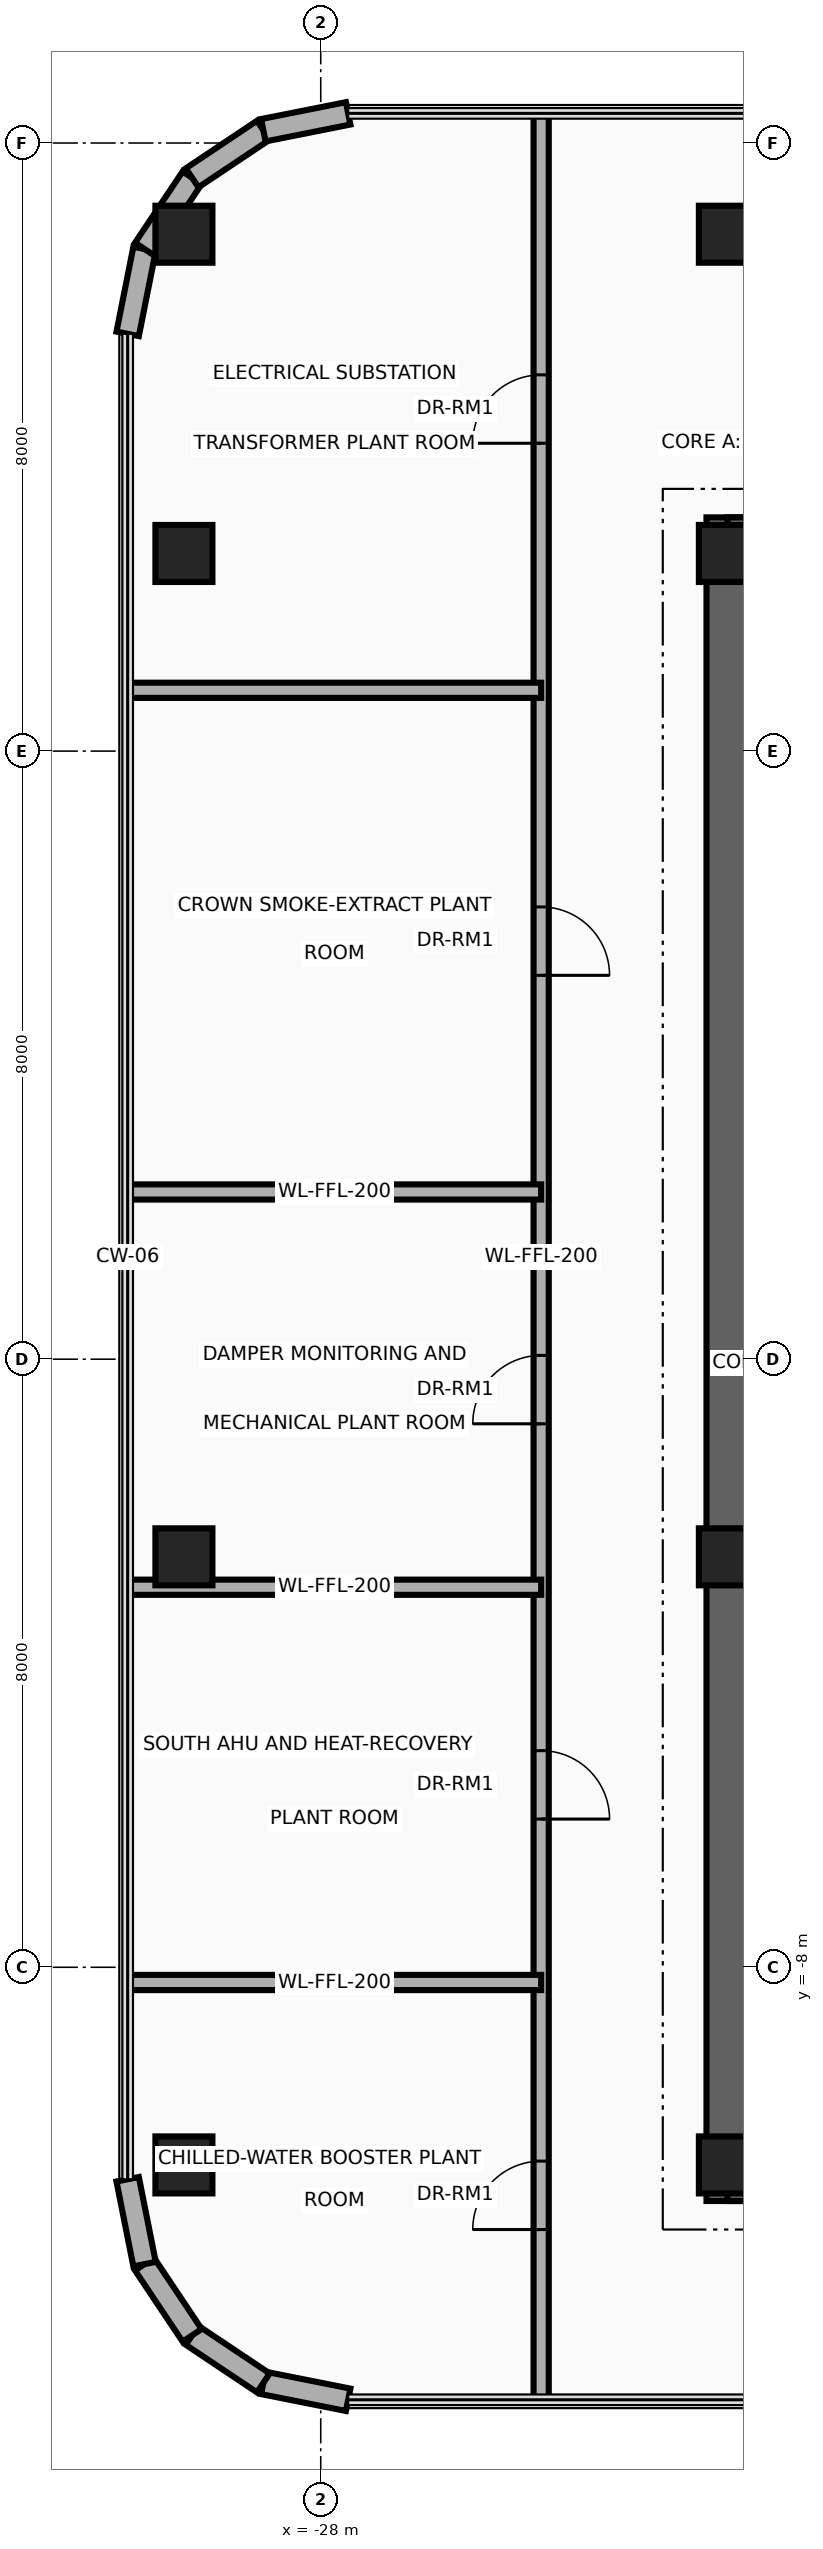
"""IFC4 building model, lengths in metres.
Left out: names, types, materials, properties, quantities, classifications, styles, units other than length and angle.
Written with IfcOpenShell. Run it as: python <this file> out.ifc"""

import sys

from ifc_helpers import new_model, si_unit, direction, frame, frame_2d, origin, origin_2d, place, context, subcontext, project, spatial, rectangle, extrude, source, transform, mapped, element, fill, save


model = new_model("IFC4")
c1 = context("Model", 3, precision=1e-05, world=origin(), true_north=direction((0.0, 1.0)))
c2 = subcontext(c1, "Body", "Model", "MODEL_VIEW")
j1 = project(units=[si_unit("LENGTHUNIT", "METRE"), si_unit("PLANEANGLEUNIT", "RADIAN")], contexts=[c1])
p1 = place(None, origin())
s1 = spatial("IfcSite", under=j1, at=p1, CompositionType="ELEMENT")
p2 = place(p1, origin())
s2 = spatial("IfcBuilding", under=s1, at=p2, CompositionType="ELEMENT")
p3 = place(p2, frame((0.0, 0.0, 299.4)))
s3 = spatial("IfcBuildingStorey", under=s2, at=p3, CompositionType="ELEMENT", Elevation=299.4)
p4 = place(p3, frame((-22.65, -11.075, 0.0), z_axis=(0.0, 0.0, 1.0), x_axis=(0.0, 1.0, 0.0)))
e1 = element("IfcWall", 1, at=p4, inside=s3, PredefinedType="SHEAR", context=c2, shape_type="SweptSolid", body=[
    extrude(rectangle(XDim=22.15, YDim=0.55, at=frame_2d((11.075, 0.0))), origin(), (0.0, 0.0, 1.0), 3.96),
])
for number, where, z_axis, x_axis in (
    (2, (-22.65, 10.8, 0.0), (0.0, 0.0, 1.0), (1.0, 0.0, 0.0)),
    (3, (-22.65, -10.8, 0.0), (0.0, 0.0, 1.0), (1.0, 0.0, 0.0)),
):
    element("IfcWall", number, at=place(p3, frame(where, z_axis=z_axis, x_axis=x_axis)), inside=s3, PredefinedType="SHEAR", context=c2, shape_type="SweptSolid", body=[
        extrude(rectangle(XDim=10.25, YDim=0.55, at=frame_2d((5.125, 0.0))), origin(), (0.0, 0.0, 1.0), 3.96),
    ])
m1 = source(origin(), c2, "Body", "SweptSolid", [
    extrude(rectangle(XDim=0.75, YDim=0.75, at=origin_2d()), origin(), (0.0, 0.0, 1.0), 4.2),
])
for number, where, z_axis, x_axis in (
    (4, (-29.8, -10.6, 0.0), (0.0, 0.0, 1.0), (1.0, 0.0, 0.0)),
    (5, (-22.65, -10.6, 0.0), (0.0, 0.0, 1.0), (1.0, 0.0, 0.0)),
    (6, (-29.8, -2.6, 0.0), (0.0, 0.0, 1.0), (1.0, 0.0, 0.0)),
    (7, (-22.65, -2.6, 0.0), (0.0, 0.0, 1.0), (1.0, 0.0, 0.0)),
    (8, (-29.8, 10.6, 0.0), (0.0, 0.0, 1.0), (1.0, 0.0, 0.0)),
    (9, (-22.65, 10.6, 0.0), (0.0, 0.0, 1.0), (1.0, 0.0, 0.0)),
    (10, (-29.8, 14.8, 0.0), (0.0, 0.0, 1.0), (1.0, 0.0, 0.0)),
    (11, (-22.65, 14.8, 0.0), (0.0, 0.0, 1.0), (1.0, 0.0, 0.0)),
):
    element("IfcColumn", number, at=place(p3, frame(where, z_axis=z_axis, x_axis=x_axis)), inside=s3, PredefinedType="COLUMN", context=c2, shape_type="MappedRepresentation", body=[
        mapped(m1, transform((0.0, 0.0, 0.0), x_axis=(1.0, 0.0, 0.0), y_axis=(0.0, 1.0, 0.0), z_axis=(0.0, 0.0, 1.0), scale=1.0)),
    ])
p5 = place(p3, frame((-30.54, 13.489, 0.0), z_axis=(0.0, 0.0, 1.0), x_axis=(0.195043173023, 0.980794657743, 0.0)))
e12 = element("IfcWall", 12, at=p5, inside=s3, PredefinedType="SOLIDWALL", context=c2, shape_type="SweptSolid", body=[
    extrude(rectangle(XDim=1.138, YDim=0.3, at=frame_2d((0.569, 0.0))), origin(), (0.0, 0.0, 1.0), 3.96),
])
for number, where, z_axis, x_axis in (
    (13, (-30.318, 14.605, 0.0), (0.0, 0.0, 1.0), (0.556, 0.831, 0.0)),
    (14, (-29.692, 15.542, 0.0), (0.0, 0.0, 1.0), (0.831, 0.556, 0.0)),
):
    element("IfcWall", number, at=place(p3, frame(where, z_axis=z_axis, x_axis=x_axis)), inside=s3, PredefinedType="SOLIDWALL", context=c2, shape_type="SweptSolid", body=[
        extrude(rectangle(XDim=1.127, YDim=0.3, at=frame_2d((0.563, 0.0))), origin(), (0.0, 0.0, 1.0), 3.96),
    ])
for number, where, z_axis, x_axis in (
    (15, (-28.755, 16.168, 0.0), (0.0, 0.0, 1.0), (0.981, 0.195, 0.0)),
    (16, (-27.639, -13.69, 0.0), (0.0, 0.0, 1.0), (-0.981, 0.195, 0.0)),
):
    element("IfcWall", number, at=place(p3, frame(where, z_axis=z_axis, x_axis=x_axis)), inside=s3, PredefinedType="SOLIDWALL", context=c2, shape_type="SweptSolid", body=[
        extrude(rectangle(XDim=1.138, YDim=0.3, at=frame_2d((0.569, 0.0))), origin(), (0.0, 0.0, 1.0), 3.96),
    ])
for number, where, z_axis, x_axis in (
    (17, (-28.755, -13.468, 0.0), (0.0, 0.0, 1.0), (-0.831, 0.556, 0.0)),
    (18, (-29.692, -12.842, 0.0), (0.0, 0.0, 1.0), (-0.556, 0.831, 0.0)),
):
    element("IfcWall", number, at=place(p3, frame(where, z_axis=z_axis, x_axis=x_axis)), inside=s3, PredefinedType="SOLIDWALL", context=c2, shape_type="SweptSolid", body=[
        extrude(rectangle(XDim=1.127, YDim=0.3, at=frame_2d((0.563, 0.0))), origin(), (0.0, 0.0, 1.0), 3.96),
    ])
p6 = place(p3, frame((-30.318, -11.905, 0.0), z_axis=(0.0, 0.0, 1.0), x_axis=(-0.195043173023, 0.980794657743, 0.0)))
e19 = element("IfcWall", 19, at=p6, inside=s3, PredefinedType="SOLIDWALL", context=c2, shape_type="SweptSolid", body=[
    extrude(rectangle(XDim=1.138, YDim=0.3, at=frame_2d((0.569, 0.0))), origin(), (0.0, 0.0, 1.0), 3.96),
])
p7 = place(p3, frame((-25.1, -13.69, 0.0), z_axis=(0.0, 0.0, 1.0), x_axis=(0.0, 1.0, 0.0)))
e20 = element("IfcWall", 20, at=p7, inside=s3, PredefinedType="PARTITIONING", context=c2, shape_type="SweptSolid", body=[
    extrude(rectangle(XDim=30.08, YDim=0.2, at=frame_2d((15.04, 0.0))), origin(), (0.0, 0.0, 1.0), 3.323),
])
p8 = place(p7, frame((2.24, 0.0, 0.0)))
e21 = element("IfcOpeningElement", 21, at=p8, cuts=e20, PredefinedType="OPENING", context=c2, shape_type="SweptSolid", body=[
    extrude(rectangle(XDim=0.9, YDim=2.1, at=frame_2d((0.45, 1.05))), frame((0.0, 0.115, 0.0), z_axis=(0.0, -1.0, 0.0), x_axis=(1.0, 0.0, 0.0)), (0.0, 0.0, 1.0), 0.23),
])
p9 = place(p7, frame((7.64, 0.0, 0.0)))
e22 = element("IfcOpeningElement", 22, at=p9, cuts=e20, PredefinedType="OPENING", context=c2, shape_type="SweptSolid", body=[
    extrude(rectangle(XDim=0.9, YDim=2.1, at=frame_2d((0.45, 1.05))), frame((0.0, 0.115, 0.0), z_axis=(0.0, -1.0, 0.0), x_axis=(1.0, 0.0, 0.0)), (0.0, 0.0, 1.0), 0.23),
])
p10 = place(p7, frame((12.84, 0.0, 0.0)))
e23 = element("IfcOpeningElement", 23, at=p10, cuts=e20, PredefinedType="OPENING", context=c2, shape_type="SweptSolid", body=[
    extrude(rectangle(XDim=0.9, YDim=2.1, at=frame_2d((0.45, 1.05))), frame((0.0, 0.115, 0.0), z_axis=(0.0, -1.0, 0.0), x_axis=(1.0, 0.0, 0.0)), (0.0, 0.0, 1.0), 0.23),
])
p11 = place(p7, frame((18.74, 0.0, 0.0)))
e24 = element("IfcOpeningElement", 24, at=p11, cuts=e20, PredefinedType="OPENING", context=c2, shape_type="SweptSolid", body=[
    extrude(rectangle(XDim=0.9, YDim=2.1, at=frame_2d((0.45, 1.05))), frame((0.0, 0.115, 0.0), z_axis=(0.0, -1.0, 0.0), x_axis=(1.0, 0.0, 0.0)), (0.0, 0.0, 1.0), 0.23),
])
p12 = place(p7, frame((25.74, 0.0, 0.0)))
e25 = element("IfcOpeningElement", 25, at=p12, cuts=e20, PredefinedType="OPENING", context=c2, shape_type="SweptSolid", body=[
    extrude(rectangle(XDim=0.9, YDim=2.1, at=frame_2d((0.45, 1.05))), frame((0.0, 0.115, 0.0), z_axis=(0.0, -1.0, 0.0), x_axis=(1.0, 0.0, 0.0)), (0.0, 0.0, 1.0), 0.23),
])
for number, where, z_axis, x_axis in (
    (26, (-30.54, -8.2, 0.0), (0.0, 0.0, 1.0), (1.0, 0.0, 0.0)),
    (27, (-30.54, -3.0, 0.0), (0.0, 0.0, 1.0), (1.0, 0.0, 0.0)),
    (28, (-30.54, 2.2, 0.0), (0.0, 0.0, 1.0), (1.0, 0.0, 0.0)),
    (29, (-30.54, 8.8, 0.0), (0.0, 0.0, 1.0), (1.0, 0.0, 0.0)),
):
    element("IfcWall", number, at=place(p3, frame(where, z_axis=z_axis, x_axis=x_axis)), inside=s3, PredefinedType="PARTITIONING", context=c2, shape_type="SweptSolid", body=[
        extrude(rectangle(XDim=5.44, YDim=0.2, at=frame_2d((2.72, 0.0))), origin(), (0.0, 0.0, 1.0), 3.406),
    ])
p13 = place(p8, origin())
e30 = element("IfcDoor", 30, at=p13, inside=s3, OperationType="SINGLE_SWING_RIGHT", PredefinedType="DOOR", context=c2, shape_type="SweptSolid", body=[
    extrude(rectangle(XDim=0.9, YDim=2.1, at=frame_2d((0.45, 1.05))), frame((0.0, 0.025, 0.0), z_axis=(0.0, -1.0, 0.0), x_axis=(1.0, 0.0, 0.0)), (0.0, 0.0, 1.0), 0.05),
])
fill(e21, e30)
p14 = place(p9, frame((0.9, 0.0, 0.0), z_axis=(0.0, 0.0, 1.0), x_axis=(-1.0, 0.0, 0.0)))
e31 = element("IfcDoor", 31, at=p14, inside=s3, OperationType="SINGLE_SWING_LEFT", PredefinedType="DOOR", context=c2, shape_type="SweptSolid", body=[
    extrude(rectangle(XDim=0.9, YDim=2.1, at=frame_2d((0.45, 1.05))), frame((0.0, 0.025, 0.0), z_axis=(0.0, -1.0, 0.0), x_axis=(1.0, 0.0, 0.0)), (0.0, 0.0, 1.0), 0.05),
])
fill(e22, e31)
p15 = place(p10, origin())
e32 = element("IfcDoor", 32, at=p15, inside=s3, OperationType="SINGLE_SWING_RIGHT", PredefinedType="DOOR", context=c2, shape_type="SweptSolid", body=[
    extrude(rectangle(XDim=0.9, YDim=2.1, at=frame_2d((0.45, 1.05))), frame((0.0, 0.025, 0.0), z_axis=(0.0, -1.0, 0.0), x_axis=(1.0, 0.0, 0.0)), (0.0, 0.0, 1.0), 0.05),
])
fill(e23, e32)
p16 = place(p11, frame((0.9, 0.0, 0.0), z_axis=(0.0, 0.0, 1.0), x_axis=(-1.0, 0.0, 0.0)))
e33 = element("IfcDoor", 33, at=p16, inside=s3, OperationType="SINGLE_SWING_LEFT", PredefinedType="DOOR", context=c2, shape_type="SweptSolid", body=[
    extrude(rectangle(XDim=0.9, YDim=2.1, at=frame_2d((0.45, 1.05))), frame((0.0, 0.025, 0.0), z_axis=(0.0, -1.0, 0.0), x_axis=(1.0, 0.0, 0.0)), (0.0, 0.0, 1.0), 0.05),
])
fill(e24, e33)
p17 = place(p12, origin())
e34 = element("IfcDoor", 34, at=p17, inside=s3, OperationType="SINGLE_SWING_RIGHT", PredefinedType="DOOR", context=c2, shape_type="SweptSolid", body=[
    extrude(rectangle(XDim=0.9, YDim=2.1, at=frame_2d((0.45, 1.05))), frame((0.0, 0.025, 0.0), z_axis=(0.0, -1.0, 0.0), x_axis=(1.0, 0.0, 0.0)), (0.0, 0.0, 1.0), 0.05),
])
fill(e25, e34)
save(model, sys.argv[1])
